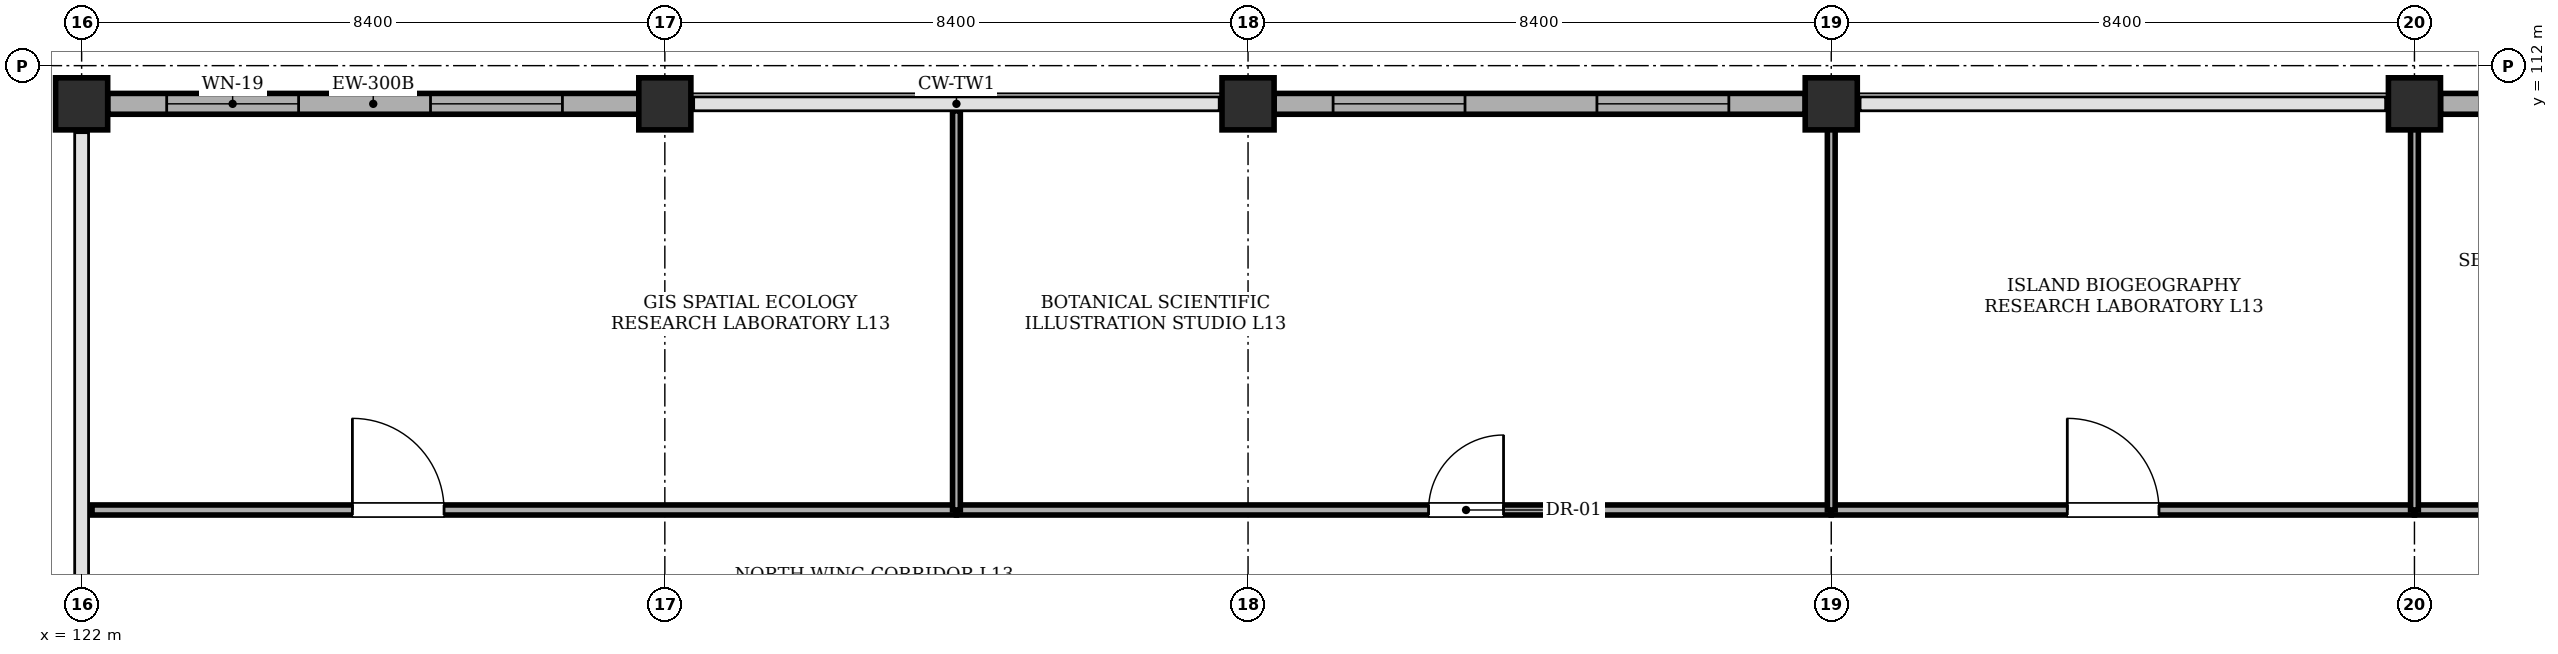
"""IFC4 building model, lengths in metres.
Left out: names, types, materials, properties, quantities, classifications, styles, units other than length and angle.
Written with IfcOpenShell. Run it as: python <this file> out.ifc"""

import sys

from ifc_helpers import new_model, si_unit, direction, frame, frame_2d, origin, origin_2d, place, context, subcontext, project, spatial, rectangle, extrude, element, fill, save


model = new_model("IFC4")
c1 = context("Model", 3, precision=1e-05, world=origin(), true_north=direction((0.0, 1.0)))
c2 = subcontext(c1, "Body", "Model", "MODEL_VIEW")
j1 = project(units=[si_unit("LENGTHUNIT", "METRE"), si_unit("PLANEANGLEUNIT", "RADIAN")], contexts=[c1])
p1 = place(None, origin())
s1 = spatial("IfcSite", under=j1, at=p1, CompositionType="ELEMENT")
p2 = place(p1, origin())
s2 = spatial("IfcBuilding", under=s1, at=p2, CompositionType="ELEMENT")
p3 = place(p2, frame((0.0, 0.0, 52.8)))
s3 = spatial("IfcBuildingStorey", under=s2, at=p3, CompositionType="ELEMENT", Elevation=52.8)
for number, where, z_axis, x_axis in (
    (1, (122.0, 111.45, 0.0), (0.0, 0.0, 1.0), (1.0, 0.0, 0.0)),
    (2, (130.4, 111.45, 0.0), (0.0, 0.0, 1.0), (1.0, 0.0, 0.0)),
    (3, (138.8, 111.45, 0.0), (0.0, 0.0, 1.0), (1.0, 0.0, 0.0)),
    (4, (147.2, 111.45, 0.0), (0.0, 0.0, 1.0), (1.0, 0.0, 0.0)),
    (5, (155.6, 111.45, 0.0), (0.0, 0.0, 1.0), (1.0, 0.0, 0.0)),
):
    element("IfcColumn", number, at=place(p3, frame(where, z_axis=z_axis, x_axis=x_axis)), inside=s3, PredefinedType="COLUMN", context=c2, shape_type="SweptSolid", body=[
        extrude(rectangle(XDim=0.75, YDim=0.75, at=origin_2d()), origin(), (0.0, 0.0, 1.0), 4.03),
    ])
p4 = place(p3, frame((122.375, 111.45, 0.0), z_axis=(0.0, 0.0, 1.0), x_axis=(1.0, 0.0, 0.0)))
e6 = element("IfcWall", 6, at=p4, inside=s3, PredefinedType="STANDARD", context=c2, shape_type="SweptSolid", body=[
    extrude(rectangle(XDim=7.65, YDim=0.3, at=frame_2d((3.825, 0.0))), origin(), (0.0, 0.0, 1.0), 3.33),
])
p5 = place(p4, frame((0.85, 0.0, 0.9)))
e7 = element("IfcOpeningElement", 7, at=p5, cuts=e6, PredefinedType="OPENING", context=c2, shape_type="SweptSolid", body=[
    extrude(rectangle(XDim=1.9, YDim=2.1, at=frame_2d((0.95, 1.05))), frame((0.0, 0.16, 0.0), z_axis=(0.0, -1.0, 0.0), x_axis=(1.0, 0.0, 0.0)), (0.0, 0.0, 1.0), 0.32),
])
p6 = place(p4, frame((4.65, 0.0, 0.9)))
e8 = element("IfcOpeningElement", 8, at=p6, cuts=e6, PredefinedType="OPENING", context=c2, shape_type="SweptSolid", body=[
    extrude(rectangle(XDim=1.9, YDim=2.1, at=frame_2d((0.95, 1.05))), frame((0.0, 0.16, 0.0), z_axis=(0.0, -1.0, 0.0), x_axis=(1.0, 0.0, 0.0)), (0.0, 0.0, 1.0), 0.32),
])
p7 = place(p3, frame((139.175, 111.45, 0.0), z_axis=(0.0, 0.0, 1.0), x_axis=(1.0, 0.0, 0.0)))
e9 = element("IfcWall", 9, at=p7, inside=s3, PredefinedType="STANDARD", context=c2, shape_type="SweptSolid", body=[
    extrude(rectangle(XDim=7.65, YDim=0.3, at=frame_2d((3.825, 0.0))), origin(), (0.0, 0.0, 1.0), 3.33),
])
p8 = place(p7, frame((0.85, 0.0, 0.9)))
e10 = element("IfcOpeningElement", 10, at=p8, cuts=e9, PredefinedType="OPENING", context=c2, shape_type="SweptSolid", body=[
    extrude(rectangle(XDim=1.9, YDim=2.1, at=frame_2d((0.95, 1.05))), frame((0.0, 0.16, 0.0), z_axis=(0.0, -1.0, 0.0), x_axis=(1.0, 0.0, 0.0)), (0.0, 0.0, 1.0), 0.32),
])
p9 = place(p7, frame((4.65, 0.0, 0.9)))
e11 = element("IfcOpeningElement", 11, at=p9, cuts=e9, PredefinedType="OPENING", context=c2, shape_type="SweptSolid", body=[
    extrude(rectangle(XDim=1.9, YDim=2.1, at=frame_2d((0.95, 1.05))), frame((0.0, 0.16, 0.0), z_axis=(0.0, -1.0, 0.0), x_axis=(1.0, 0.0, 0.0)), (0.0, 0.0, 1.0), 0.32),
])
p10 = place(p3, frame((155.975, 111.45, 0.0), z_axis=(0.0, 0.0, 1.0), x_axis=(1.0, 0.0, 0.0)))
e12 = element("IfcWall", 12, at=p10, inside=s3, PredefinedType="STANDARD", context=c2, shape_type="SweptSolid", body=[
    extrude(rectangle(XDim=7.1, YDim=0.3, at=frame_2d((3.55, 0.0))), origin(), (0.0, 0.0, 1.0), 3.33),
])
p11 = place(p10, frame((0.85, 0.0, 0.9)))
e13 = element("IfcOpeningElement", 13, at=p11, cuts=e12, PredefinedType="OPENING", context=c2, shape_type="SweptSolid", body=[
    extrude(rectangle(XDim=1.9, YDim=2.1, at=frame_2d((0.95, 1.05))), frame((0.0, 0.16, 0.0), z_axis=(0.0, -1.0, 0.0), x_axis=(1.0, 0.0, 0.0)), (0.0, 0.0, 1.0), 0.32),
])
p12 = place(p10, frame((4.65, 0.0, 0.9)))
e14 = element("IfcOpeningElement", 14, at=p12, cuts=e12, PredefinedType="OPENING", context=c2, shape_type="SweptSolid", body=[
    extrude(rectangle(XDim=1.9, YDim=2.1, at=frame_2d((0.95, 1.05))), frame((0.0, 0.16, 0.0), z_axis=(0.0, -1.0, 0.0), x_axis=(1.0, 0.0, 0.0)), (0.0, 0.0, 1.0), 0.32),
])
p13 = place(p3, frame((122.15, 105.6, 0.0), z_axis=(0.0, 0.0, 1.0), x_axis=(1.0, 0.0, 0.0)))
e15 = element("IfcWall", 15, at=p13, inside=s3, PredefinedType="PARTITIONING", context=c2, shape_type="SweptSolid", body=[
    extrude(rectangle(XDim=12.45, YDim=0.145, at=frame_2d((6.225, 0.0))), origin(), (0.0, 0.0, 1.0), 4.03),
])
p14 = place(p13, frame((3.75, 0.0, 0.0)))
e16 = element("IfcOpeningElement", 16, at=p14, cuts=e15, PredefinedType="OPENING", context=c2, shape_type="SweptSolid", body=[
    extrude(rectangle(XDim=1.32, YDim=2.2, at=frame_2d((0.66, 1.1))), frame((0.0, 0.083, 0.0), z_axis=(0.0, -1.0, 0.0), x_axis=(1.0, 0.0, 0.0)), (0.0, 0.0, 1.0), 0.165),
])
p15 = place(p3, frame((134.6, 105.6, 0.0), z_axis=(0.0, 0.0, 1.0), x_axis=(1.0, 0.0, 0.0)))
e17 = element("IfcWall", 17, at=p15, inside=s3, PredefinedType="PARTITIONING", context=c2, shape_type="SweptSolid", body=[
    extrude(rectangle(XDim=12.6, YDim=0.145, at=frame_2d((6.3, 0.0))), origin(), (0.0, 0.0, 1.0), 4.03),
])
p16 = place(p15, frame((6.8, 0.0, 0.0)))
e18 = element("IfcOpeningElement", 18, at=p16, cuts=e17, PredefinedType="OPENING", context=c2, shape_type="SweptSolid", body=[
    extrude(rectangle(XDim=1.08, YDim=2.15, at=frame_2d((0.54, 1.075))), frame((0.0, 0.083, 0.0), z_axis=(0.0, -1.0, 0.0), x_axis=(1.0, 0.0, 0.0)), (0.0, 0.0, 1.0), 0.165),
])
p17 = place(p3, frame((134.6, 105.6, 0.0), z_axis=(0.0, 0.0, 1.0), x_axis=(0.0, 1.0, 0.0)))
e19 = element("IfcWall", 19, at=p17, inside=s3, PredefinedType="PARTITIONING", context=c2, shape_type="SweptSolid", body=[
    extrude(rectangle(XDim=5.75, YDim=0.112, at=frame_2d((2.875, 0.0))), origin(), (0.0, 0.0, 1.0), 3.58),
])
p18 = place(p3, frame((147.2, 105.6, 0.0), z_axis=(0.0, 0.0, 1.0), x_axis=(1.0, 0.0, 0.0)))
e20 = element("IfcWall", 20, at=p18, inside=s3, PredefinedType="PARTITIONING", context=c2, shape_type="SweptSolid", body=[
    extrude(rectangle(XDim=8.4, YDim=0.145, at=frame_2d((4.2, 0.0))), origin(), (0.0, 0.0, 1.0), 4.03),
])
p19 = place(p18, frame((3.4, 0.0, 0.0)))
e21 = element("IfcOpeningElement", 21, at=p19, cuts=e20, PredefinedType="OPENING", context=c2, shape_type="SweptSolid", body=[
    extrude(rectangle(XDim=1.32, YDim=2.2, at=frame_2d((0.66, 1.1))), frame((0.0, 0.083, 0.0), z_axis=(0.0, -1.0, 0.0), x_axis=(1.0, 0.0, 0.0)), (0.0, 0.0, 1.0), 0.165),
])
p20 = place(p3, frame((147.2, 105.6, 0.0), z_axis=(0.0, 0.0, 1.0), x_axis=(0.0, 1.0, 0.0)))
e22 = element("IfcWall", 22, at=p20, inside=s3, PredefinedType="PARTITIONING", context=c2, shape_type="SweptSolid", body=[
    extrude(rectangle(XDim=5.75, YDim=0.112, at=frame_2d((2.875, 0.0))), origin(), (0.0, 0.0, 1.0), 3.33),
])
p21 = place(p3, frame((155.6, 105.6, 0.0), z_axis=(0.0, 0.0, 1.0), x_axis=(1.0, 0.0, 0.0)))
e23 = element("IfcWall", 23, at=p21, inside=s3, PredefinedType="PARTITIONING", context=c2, shape_type="SweptSolid", body=[
    extrude(rectangle(XDim=7.75, YDim=0.145, at=frame_2d((3.875, 0.0))), origin(), (0.0, 0.0, 1.0), 4.03),
])
p22 = place(p21, frame((3.4, 0.0, 0.0)))
e24 = element("IfcOpeningElement", 24, at=p22, cuts=e23, PredefinedType="OPENING", context=c2, shape_type="SweptSolid", body=[
    extrude(rectangle(XDim=1.08, YDim=2.15, at=frame_2d((0.54, 1.075))), frame((0.0, 0.083, 0.0), z_axis=(0.0, -1.0, 0.0), x_axis=(1.0, 0.0, 0.0)), (0.0, 0.0, 1.0), 0.165),
])
p23 = place(p3, frame((155.6, 105.6, 0.0), z_axis=(0.0, 0.0, 1.0), x_axis=(0.0, 1.0, 0.0)))
e25 = element("IfcWall", 25, at=p23, inside=s3, PredefinedType="PARTITIONING", context=c2, shape_type="SweptSolid", body=[
    extrude(rectangle(XDim=5.75, YDim=0.112, at=frame_2d((2.875, 0.0))), origin(), (0.0, 0.0, 1.0), 3.33),
])
p24 = place(p5, origin())
e26 = element("IfcWindow", 26, at=p24, inside=s3, PartitioningType="DOUBLE_PANEL_VERTICAL", PredefinedType="WINDOW", context=c2, shape_type="SweptSolid", body=[
    extrude(rectangle(XDim=1.9, YDim=2.1, at=frame_2d((0.95, 1.05))), frame((0.0, 0.03, 0.0), z_axis=(0.0, -1.0, 0.0), x_axis=(1.0, 0.0, 0.0)), (0.0, 0.0, 1.0), 0.06),
])
fill(e7, e26)
p25 = place(p6, origin())
e27 = element("IfcWindow", 27, at=p25, inside=s3, PartitioningType="DOUBLE_PANEL_VERTICAL", PredefinedType="WINDOW", context=c2, shape_type="SweptSolid", body=[
    extrude(rectangle(XDim=1.9, YDim=2.1, at=frame_2d((0.95, 1.05))), frame((0.0, 0.03, 0.0), z_axis=(0.0, -1.0, 0.0), x_axis=(1.0, 0.0, 0.0)), (0.0, 0.0, 1.0), 0.06),
])
fill(e8, e27)
p26 = place(p8, origin())
e28 = element("IfcWindow", 28, at=p26, inside=s3, PartitioningType="DOUBLE_PANEL_VERTICAL", PredefinedType="WINDOW", context=c2, shape_type="SweptSolid", body=[
    extrude(rectangle(XDim=1.9, YDim=2.1, at=frame_2d((0.95, 1.05))), frame((0.0, 0.03, 0.0), z_axis=(0.0, -1.0, 0.0), x_axis=(1.0, 0.0, 0.0)), (0.0, 0.0, 1.0), 0.06),
])
fill(e10, e28)
p27 = place(p9, origin())
e29 = element("IfcWindow", 29, at=p27, inside=s3, PartitioningType="DOUBLE_PANEL_VERTICAL", PredefinedType="WINDOW", context=c2, shape_type="SweptSolid", body=[
    extrude(rectangle(XDim=1.9, YDim=2.1, at=frame_2d((0.95, 1.05))), frame((0.0, 0.03, 0.0), z_axis=(0.0, -1.0, 0.0), x_axis=(1.0, 0.0, 0.0)), (0.0, 0.0, 1.0), 0.06),
])
fill(e11, e29)
p28 = place(p14, origin())
e30 = element("IfcDoor", 30, at=p28, inside=s3, OperationType="SINGLE_SWING_LEFT", PredefinedType="DOOR", context=c2, shape_type="SweptSolid", body=[
    extrude(rectangle(XDim=1.32, YDim=2.2, at=frame_2d((0.66, 1.1))), frame((0.0, 0.025, 0.0), z_axis=(0.0, -1.0, 0.0), x_axis=(1.0, 0.0, 0.0)), (0.0, 0.0, 1.0), 0.05),
])
fill(e16, e30)
p29 = place(p16, origin())
e31 = element("IfcDoor", 31, at=p29, inside=s3, OperationType="SINGLE_SWING_RIGHT", PredefinedType="DOOR", context=c2, shape_type="SweptSolid", body=[
    extrude(rectangle(XDim=1.08, YDim=2.15, at=frame_2d((0.54, 1.075))), frame((0.0, 0.025, 0.0), z_axis=(0.0, -1.0, 0.0), x_axis=(1.0, 0.0, 0.0)), (0.0, 0.0, 1.0), 0.05),
])
fill(e18, e31)
p30 = place(p19, origin())
e32 = element("IfcDoor", 32, at=p30, inside=s3, OperationType="SINGLE_SWING_LEFT", PredefinedType="DOOR", context=c2, shape_type="SweptSolid", body=[
    extrude(rectangle(XDim=1.32, YDim=2.2, at=frame_2d((0.66, 1.1))), frame((0.0, 0.025, 0.0), z_axis=(0.0, -1.0, 0.0), x_axis=(1.0, 0.0, 0.0)), (0.0, 0.0, 1.0), 0.05),
])
fill(e21, e32)
save(model, sys.argv[1])
